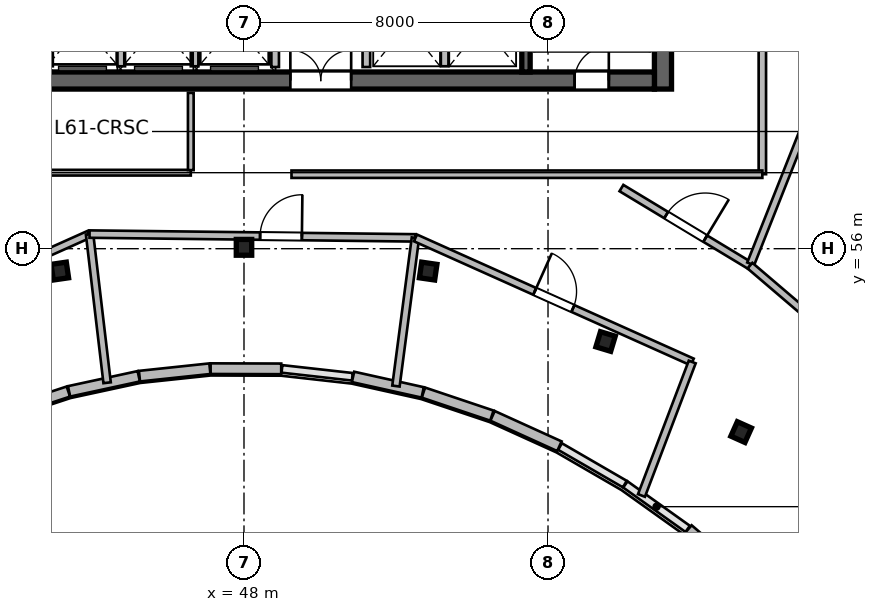
"""IFC4 building model, lengths in metres.
Left out: names, types, materials, properties, quantities, classifications, styles, units other than length and angle.
Written with IfcOpenShell. Run it as: python <this file> out.ifc"""

import sys

from ifc_helpers import new_model, si_unit, direction, frame, frame_2d, origin, origin_2d, place, context, subcontext, project, spatial, rectangle, i_section, extrude, source, transform, mapped, element, fill, save


model = new_model("IFC4")
c1 = context("Model", 3, precision=1e-05, world=origin(), true_north=direction((0.0, 1.0)))
c2 = subcontext(c1, "Body", "Model", "MODEL_VIEW")
j1 = project(units=[si_unit("LENGTHUNIT", "METRE"), si_unit("PLANEANGLEUNIT", "RADIAN")], contexts=[c1])
p1 = place(None, origin())
s1 = spatial("IfcSite", under=j1, at=p1, CompositionType="ELEMENT")
p2 = place(p1, origin())
s2 = spatial("IfcBuilding", under=s1, at=p2, CompositionType="ELEMENT")
p3 = place(p2, frame((0.0, 0.0, 250.8)))
s3 = spatial("IfcBuildingStorey", under=s2, at=p3, CompositionType="ELEMENT", Elevation=250.8)
m1 = source(origin(), c2, "Body", "SweptSolid", [
    extrude(rectangle(XDim=12.0, YDim=0.45, at=frame_2d((6.0, 0.0))), origin(), (0.0, 0.0, 1.0), 3.9),
])
p4 = place(p3, frame((59.025, 60.2, 0.0), z_axis=(0.0, 0.0, 1.0), x_axis=(0.0, 1.0, 0.0)))
e1 = element("IfcWall", 1, at=p4, inside=s3, PredefinedType="SHEAR", context=c2, shape_type="MappedRepresentation", body=[
    mapped(m1, transform((0.0, 0.0, 0.0), scale=1.0)),
])
m2 = source(origin(), c2, "Body", "SweptSolid", [
    extrude(rectangle(XDim=21.6, YDim=0.45, at=frame_2d((10.8, 0.0))), origin(), (0.0, 0.0, 1.0), 3.9),
])
p5 = place(p3, frame((37.2, 60.425, 0.0), z_axis=(0.0, 0.0, 1.0), x_axis=(1.0, 0.0, 0.0)))
e2 = element("IfcWall", 2, at=p5, inside=s3, PredefinedType="SHEAR", context=c2, shape_type="MappedRepresentation", body=[
    mapped(m2, transform((0.0, 0.0, 0.0), scale=1.0)),
])
p6 = place(p5, frame((1.1, 0.0, 0.0)))
e3 = element("IfcOpeningElement", 3, at=p6, cuts=e2, PredefinedType="OPENING", context=c2, shape_type="SweptSolid", body=[
    extrude(rectangle(XDim=1.15, YDim=2.15, at=frame_2d((0.575, 1.075))), frame((0.0, 0.235, 0.0), z_axis=(0.0, -1.0, 0.0), x_axis=(1.0, 0.0, 0.0)), (0.0, 0.0, 1.0), 0.47),
])
p7 = place(p5, frame((19.5, 0.0, 0.0)))
e4 = element("IfcOpeningElement", 4, at=p7, cuts=e2, PredefinedType="OPENING", context=c2, shape_type="SweptSolid", body=[
    extrude(rectangle(XDim=0.9, YDim=2.1, at=frame_2d((0.45, 1.05))), frame((0.0, 0.235, 0.0), z_axis=(0.0, -1.0, 0.0), x_axis=(1.0, 0.0, 0.0)), (0.0, 0.0, 1.0), 0.47),
])
p8 = place(p5, frame((12.02, 0.0, 0.0)))
e5 = element("IfcOpeningElement", 5, at=p8, cuts=e2, PredefinedType="OPENING", context=c2, shape_type="SweptSolid", body=[
    extrude(rectangle(XDim=1.6, YDim=2.15, at=frame_2d((0.8, 1.075))), frame((0.0, 0.235, 0.0), z_axis=(0.0, -1.0, 0.0), x_axis=(1.0, 0.0, 0.0)), (0.0, 0.0, 1.0), 0.47),
])
m3 = source(origin(), c2, "Body", "SweptSolid", [
    extrude(rectangle(XDim=11.1, YDim=0.22, at=frame_2d((5.55, 0.0))), origin(), (0.0, 0.0, 1.0), 3.9),
])
p9 = place(p3, frame((55.42, 60.65, 0.0), z_axis=(0.0, 0.0, 1.0), x_axis=(0.0, 1.0, 0.0)))
e6 = element("IfcWall", 6, at=p9, inside=s3, PredefinedType="SHEAR", context=c2, shape_type="MappedRepresentation", body=[
    mapped(m3, transform((0.0, 0.0, 0.0), scale=1.0)),
])
p10 = place(p9, frame((9.595, 0.0, 0.0)))
e7 = element("IfcOpeningElement", 7, at=p10, cuts=e6, PredefinedType="OPENING", context=c2, shape_type="SweptSolid", body=[
    extrude(rectangle(XDim=1.15, YDim=2.15, at=frame_2d((0.575, 1.075))), frame((0.0, 0.12, 0.0), z_axis=(0.0, -1.0, 0.0), x_axis=(1.0, 0.0, 0.0)), (0.0, 0.0, 1.0), 0.24),
])
m4 = source(origin(), c2, "Body", "SweptSolid", [
    extrude(i_section(OverallWidth=0.406, OverallDepth=0.416, WebThickness=0.03, FlangeThickness=0.048, at=origin_2d()), origin(), (0.0, 0.0, 1.0), 3.9),
])
for number, where, z_axis, x_axis in (
    (8, (43.154, 55.411, 0.0), (0.0, 0.0, 1.0), (-0.143, 0.99, 0.0)),
    (9, (48.0, 56.036, 0.0), (0.0, 0.0, 1.0), (0.0, 1.0, 0.0)),
    (10, (52.846, 55.411, 0.0), (0.0, 0.0, 1.0), (0.143, 0.99, 0.0)),
    (11, (57.515, 53.558, 0.0), (0.0, 0.0, 1.0), (0.289, 0.957, 0.0)),
    (12, (61.082, 51.175, 0.0), (0.0, 0.0, 1.0), (0.409, 0.912, 0.0)),
):
    element("IfcColumn", number, at=place(p3, frame(where, z_axis=z_axis, x_axis=x_axis)), inside=s3, PredefinedType="COLUMN", context=c2, shape_type="MappedRepresentation", body=[
        mapped(m4, transform((0.0, 0.0, 0.0), scale=1.0)),
    ])
m5 = source(origin(), c2, "Body", "SweptSolid", [
    extrude(rectangle(XDim=2.022, YDim=0.28, at=frame_2d((1.011, 0.0))), origin(), (0.0, 0.0, 1.0), 3.58),
])
p11 = place(p3, frame((61.222, 47.299, 0.0), z_axis=(0.0, 0.0, 1.0), x_axis=(-0.758343943716, 0.651854633358, 0.0)))
e13 = element("IfcWall", 13, at=p11, inside=s3, PredefinedType="SOLIDWALL", context=c2, shape_type="MappedRepresentation", body=[
    mapped(m5, transform((0.0, 0.0, 0.0), scale=1.0)),
])
m6 = source(origin(), c2, "Body", "SweptSolid", [
    extrude(rectangle(XDim=1.933, YDim=0.28, at=frame_2d((0.966, 0.0))), origin(), (0.0, 0.0, 1.0), 3.58),
])
p12 = place(p3, frame((56.3, 50.802, 0.0), z_axis=(0.0, 0.0, 1.0), x_axis=(-0.910478916145, 0.413555489936, 0.0)))
e14 = element("IfcWall", 14, at=p12, inside=s3, PredefinedType="SOLIDWALL", context=c2, shape_type="MappedRepresentation", body=[
    mapped(m6, transform((0.0, 0.0, 0.0), scale=1.0)),
])
m7 = source(origin(), c2, "Body", "SweptSolid", [
    extrude(rectangle(XDim=1.901, YDim=0.28, at=frame_2d((0.951, 0.0))), origin(), (0.0, 0.0, 1.0), 3.58),
])
p13 = place(p3, frame((54.523, 51.608, 0.0), z_axis=(0.0, 0.0, 1.0), x_axis=(-0.94793587841, 0.318461254194, 0.0)))
e15 = element("IfcWall", 15, at=p13, inside=s3, PredefinedType="SOLIDWALL", context=c2, shape_type="MappedRepresentation", body=[
    mapped(m7, transform((0.0, 0.0, 0.0), scale=1.0)),
])
m8 = source(origin(), c2, "Body", "SweptSolid", [
    extrude(rectangle(XDim=1.878, YDim=0.28, at=frame_2d((0.939, 0.0))), origin(), (0.0, 0.0, 1.0), 3.58),
])
p14 = place(p3, frame((52.702, 52.219, 0.0), z_axis=(0.0, 0.0, 1.0), x_axis=(-0.976138082714, 0.217150739061, 0.0)))
e16 = element("IfcWall", 16, at=p14, inside=s3, PredefinedType="SOLIDWALL", context=c2, shape_type="MappedRepresentation", body=[
    mapped(m8, transform((0.0, 0.0, 0.0), scale=1.0)),
])
m9 = source(origin(), c2, "Body", "SweptSolid", [
    extrude(rectangle(XDim=1.858, YDim=0.28, at=frame_2d((0.929, 0.0))), origin(), (0.0, 0.0, 1.0), 3.58),
])
p15 = place(p3, frame((48.979, 52.838, 0.0), z_axis=(0.0, 0.0, 1.0), x_axis=(-0.999995433965, 0.003021928128, 0.0)))
e17 = element("IfcWall", 17, at=p15, inside=s3, PredefinedType="SOLIDWALL", context=c2, shape_type="MappedRepresentation", body=[
    mapped(m9, transform((0.0, 0.0, 0.0), scale=1.0)),
])
m10 = source(origin(), c2, "Body", "SweptSolid", [
    extrude(rectangle(XDim=1.862, YDim=0.28, at=frame_2d((0.931, 0.0))), origin(), (0.0, 0.0, 1.0), 3.58),
])
p16 = place(p3, frame((47.102, 52.842, 0.0), z_axis=(0.0, 0.0, 1.0), x_axis=(-0.994430497743, -0.1053944266, 0.0)))
e18 = element("IfcWall", 18, at=p16, inside=s3, PredefinedType="SOLIDWALL", context=c2, shape_type="MappedRepresentation", body=[
    mapped(m10, transform((0.0, 0.0, 0.0), scale=1.0)),
])
m11 = source(origin(), c2, "Body", "SweptSolid", [
    extrude(rectangle(XDim=1.877, YDim=0.28, at=frame_2d((0.938, 0.0))), origin(), (0.0, 0.0, 1.0), 3.58),
])
p17 = place(p3, frame((45.231, 52.643, 0.0), z_axis=(0.0, 0.0, 1.0), x_axis=(-0.97737202312, -0.211527606761, 0.0)))
e19 = element("IfcWall", 19, at=p17, inside=s3, PredefinedType="SOLIDWALL", context=c2, shape_type="MappedRepresentation", body=[
    mapped(m11, transform((0.0, 0.0, 0.0), scale=1.0)),
])
m12 = source(origin(), c2, "Body", "SweptSolid", [
    extrude(rectangle(XDim=1.9, YDim=0.28, at=frame_2d((0.95, 0.0))), origin(), (0.0, 0.0, 1.0), 3.58),
])
p18 = place(p3, frame((43.378, 52.241, 0.0), z_axis=(0.0, 0.0, 1.0), x_axis=(-0.949693643068, -0.313180434121, 0.0)))
e20 = element("IfcWall", 20, at=p18, inside=s3, PredefinedType="SOLIDWALL", context=c2, shape_type="MappedRepresentation", body=[
    mapped(m12, transform((0.0, 0.0, 0.0), scale=1.0)),
])
m13 = source(origin(), c2, "Body", "SweptSolid", [
    extrude(rectangle(XDim=2.24, YDim=0.2, at=frame_2d((1.12, 0.0))), origin(), (0.0, 0.0, 1.0), 3.58),
])
for number, where, z_axis, x_axis in (
    (21, (48.82, 60.78, 0.0), (0.0, 0.0, 1.0), (0.0, 1.0, 0.0)),
    (22, (51.22, 60.78, 0.0), (0.0, 0.0, 1.0), (0.0, 1.0, 0.0)),
):
    element("IfcWall", number, at=place(p3, frame(where, z_axis=z_axis, x_axis=x_axis)), inside=s3, PredefinedType="SOLIDWALL", context=c2, shape_type="MappedRepresentation", body=[
        mapped(m13, transform((0.0, 0.0, 0.0), scale=1.0)),
    ])
m14 = source(origin(), c2, "Body", "SweptSolid", [
    extrude(rectangle(XDim=2.2, YDim=0.2, at=frame_2d((1.1, 0.0))), origin(), (0.0, 0.0, 1.0), 3.58),
])
for number, where, z_axis, x_axis in (
    (23, (42.87, 60.8, 0.0), (0.0, 0.0, 1.0), (0.0, 1.0, 0.0)),
    (24, (44.77, 60.8, 0.0), (0.0, 0.0, 1.0), (0.0, 1.0, 0.0)),
    (25, (46.7, 60.8, 0.0), (0.0, 0.0, 1.0), (0.0, 1.0, 0.0)),
    (26, (53.28, 60.8, 0.0), (0.0, 0.0, 1.0), (0.0, 1.0, 0.0)),
):
    element("IfcWall", number, at=place(p3, frame(where, z_axis=z_axis, x_axis=x_axis)), inside=s3, PredefinedType="SOLIDWALL", context=c2, shape_type="MappedRepresentation", body=[
        mapped(m14, transform((0.0, 0.0, 0.0), scale=1.0)),
    ])
m15 = source(origin(), c2, "Body", "SweptSolid", [
    extrude(rectangle(XDim=5.4, YDim=0.15, at=frame_2d((2.7, 0.0))), origin(), (0.0, 0.0, 1.0), 3.58),
])
p19 = place(p3, frame((41.2, 58.0, 0.0), z_axis=(0.0, 0.0, 1.0), x_axis=(1.0, 0.0, 0.0)))
e27 = element("IfcWall", 27, at=p19, inside=s3, PredefinedType="PARTITIONING", context=c2, shape_type="MappedRepresentation", body=[
    mapped(m15, transform((0.0, 0.0, 0.0), scale=1.0)),
])
m16 = source(origin(), c2, "Body", "SweptSolid", [
    extrude(rectangle(XDim=2.033, YDim=0.15, at=frame_2d((1.016, 0.0))), origin(), (0.0, 0.0, 1.0), 3.58),
])
p20 = place(p3, frame((46.6, 58.067, 0.0), z_axis=(0.0, 0.0, 1.0), x_axis=(0.0, 1.0, 0.0)))
e28 = element("IfcWall", 28, at=p20, inside=s3, PredefinedType="PARTITIONING", context=c2, shape_type="MappedRepresentation", body=[
    mapped(m16, transform((0.0, 0.0, 0.0), scale=1.0)),
])
m17 = source(origin(), c2, "Body", "SweptSolid", [
    extrude(rectangle(XDim=8.913, YDim=0.195, at=frame_2d((4.457, 0.0))), origin(), (0.0, 0.0, 1.0), 3.58),
])
p21 = place(p3, frame((35.803, 52.738, 0.0), z_axis=(0.0, 0.0, 1.0), x_axis=(0.912488521546, 0.409102307555, 0.0)))
e29 = element("IfcWall", 29, at=p21, inside=s3, PredefinedType="PARTITIONING", context=c2, shape_type="MappedRepresentation", body=[
    mapped(m17, transform((0.0, 0.0, 0.0), scale=1.0)),
])
p22 = place(p21, frame((3.906, 0.0, 0.0)))
e30 = element("IfcOpeningElement", 30, at=p22, cuts=e29, PredefinedType="OPENING", context=c2, shape_type="SweptSolid", body=[
    extrude(rectangle(XDim=1.1, YDim=2.15, at=frame_2d((0.55, 1.075))), frame((0.0, 0.107, 0.0), z_axis=(0.0, -1.0, 0.0), x_axis=(1.0, 0.0, 0.0)), (0.0, 0.0, 1.0), 0.215),
])
m18 = source(origin(), c2, "Body", "SweptSolid", [
    extrude(rectangle(XDim=3.939, YDim=0.195, at=frame_2d((1.969, 0.0))), origin(), (0.0, 0.0, 1.0), 3.58),
])
p23 = place(p3, frame((44.398, 52.473, 0.0), z_axis=(0.0, 0.0, 1.0), x_axis=(-0.117395053494, 0.993085294129, 0.0)))
e31 = element("IfcWall", 31, at=p23, inside=s3, PredefinedType="PARTITIONING", context=c2, shape_type="MappedRepresentation", body=[
    mapped(m18, transform((0.0, 0.0, 0.0), scale=1.0)),
])
m19 = source(origin(), c2, "Body", "SweptSolid", [
    extrude(rectangle(XDim=8.576, YDim=0.195, at=frame_2d((4.288, 0.0))), origin(), (0.0, 0.0, 1.0), 3.58),
])
p24 = place(p3, frame((43.936, 56.385, 0.0), z_axis=(0.0, 0.0, 1.0), x_axis=(0.999931553434, -0.011699933624, 0.0)))
e32 = element("IfcWall", 32, at=p24, inside=s3, PredefinedType="PARTITIONING", context=c2, shape_type="MappedRepresentation", body=[
    mapped(m19, transform((0.0, 0.0, 0.0), scale=1.0)),
])
p25 = place(p24, frame((4.488, 0.0, 0.0)))
e33 = element("IfcOpeningElement", 33, at=p25, cuts=e32, PredefinedType="OPENING", context=c2, shape_type="SweptSolid", body=[
    extrude(rectangle(XDim=1.1, YDim=2.15, at=frame_2d((0.55, 1.075))), frame((0.0, 0.107, 0.0), z_axis=(0.0, -1.0, 0.0), x_axis=(1.0, 0.0, 0.0)), (0.0, 0.0, 1.0), 0.215),
])
m20 = source(origin(), c2, "Body", "SweptSolid", [
    extrude(rectangle(XDim=3.932, YDim=0.195, at=frame_2d((1.966, 0.0))), origin(), (0.0, 0.0, 1.0), 3.58),
])
p26 = place(p3, frame((51.998, 52.385, 0.0), z_axis=(0.0, 0.0, 1.0), x_axis=(0.130504299366, 0.991447743377, 0.0)))
e34 = element("IfcWall", 34, at=p26, inside=s3, PredefinedType="PARTITIONING", context=c2, shape_type="MappedRepresentation", body=[
    mapped(m20, transform((0.0, 0.0, 0.0), scale=1.0)),
])
m21 = source(origin(), c2, "Body", "SweptSolid", [
    extrude(rectangle(XDim=7.982, YDim=0.195, at=frame_2d((3.991, 0.0))), origin(), (0.0, 0.0, 1.0), 3.58),
])
p27 = place(p3, frame((52.511, 56.284, 0.0), z_axis=(0.0, 0.0, 1.0), x_axis=(0.91248609472, -0.409107720464, 0.0)))
e35 = element("IfcWall", 35, at=p27, inside=s3, PredefinedType="PARTITIONING", context=c2, shape_type="MappedRepresentation", body=[
    mapped(m21, transform((0.0, 0.0, 0.0), scale=1.0)),
])
p28 = place(p27, frame((3.441, 0.0, 0.0)))
e36 = element("IfcOpeningElement", 36, at=p28, cuts=e35, PredefinedType="OPENING", context=c2, shape_type="SweptSolid", body=[
    extrude(rectangle(XDim=1.1, YDim=2.15, at=frame_2d((0.55, 1.075))), frame((0.0, 0.107, 0.0), z_axis=(0.0, -1.0, 0.0), x_axis=(1.0, 0.0, 0.0)), (0.0, 0.0, 1.0), 0.215),
])
m22 = source(origin(), c2, "Body", "SweptSolid", [
    extrude(rectangle(XDim=3.757, YDim=0.195, at=frame_2d((1.879, 0.0))), origin(), (0.0, 0.0, 1.0), 3.58),
])
p29 = place(p3, frame((58.459, 49.507, 0.0), z_axis=(0.0, 0.0, 1.0), x_axis=(0.355427833237, 0.93470372598, 0.0)))
e37 = element("IfcWall", 37, at=p29, inside=s3, PredefinedType="PARTITIONING", context=c2, shape_type="MappedRepresentation", body=[
    mapped(m22, transform((0.0, 0.0, 0.0), scale=1.0)),
])
m23 = source(origin(), c2, "Body", "SweptSolid", [
    extrude(rectangle(XDim=3.951, YDim=0.195, at=frame_2d((1.975, 0.0))), origin(), (0.0, 0.0, 1.0), 3.58),
])
p30 = place(p3, frame((57.932, 57.596, 0.0), z_axis=(0.0, 0.0, 1.0), x_axis=(0.856137696849, -0.51674775668, 0.0)))
e38 = element("IfcWall", 38, at=p30, inside=s3, PredefinedType="PARTITIONING", context=c2, shape_type="MappedRepresentation", body=[
    mapped(m23, transform((0.0, 0.0, 0.0), scale=1.0)),
])
p31 = place(p30, frame((1.375, 0.0, 0.0)))
e39 = element("IfcOpeningElement", 39, at=p31, cuts=e38, PredefinedType="OPENING", context=c2, shape_type="SweptSolid", body=[
    extrude(rectangle(XDim=1.2, YDim=2.15, at=frame_2d((0.6, 1.075))), frame((0.0, 0.107, 0.0), z_axis=(0.0, -1.0, 0.0), x_axis=(1.0, 0.0, 0.0)), (0.0, 0.0, 1.0), 0.215),
])
m24 = source(origin(), c2, "Body", "SweptSolid", [
    extrude(rectangle(XDim=18.471, YDim=0.195, at=frame_2d((9.235, 0.0))), origin(), (0.0, 0.0, 1.0), 3.58),
])
p32 = place(p3, frame((61.333, 55.602, 0.0), z_axis=(0.0, 0.0, 1.0), x_axis=(0.368827756565, 0.929497760076, 0.0)))
e40 = element("IfcWall", 40, at=p32, inside=s3, PredefinedType="PARTITIONING", context=c2, shape_type="MappedRepresentation", body=[
    mapped(m24, transform((0.0, 0.0, 0.0), scale=1.0)),
])
m25 = source(origin(), c2, "Body", "SweptSolid", [
    extrude(rectangle(XDim=4.935, YDim=0.195, at=frame_2d((2.467, 0.0))), origin(), (0.0, 0.0, 1.0), 3.58),
])
p33 = place(p3, frame((61.314, 55.554, 0.0), z_axis=(0.0, 0.0, 1.0), x_axis=(0.760547222161, -0.649282621716, 0.0)))
e41 = element("IfcWall", 41, at=p33, inside=s3, PredefinedType="PARTITIONING", context=c2, shape_type="MappedRepresentation", body=[
    mapped(m25, transform((0.0, 0.0, 0.0), scale=1.0)),
])
p34 = place(p33, frame((1.867, 0.0, 0.0)))
e42 = element("IfcOpeningElement", 42, at=p34, cuts=e41, PredefinedType="OPENING", context=c2, shape_type="SweptSolid", body=[
    extrude(rectangle(XDim=1.2, YDim=2.15, at=frame_2d((0.6, 1.075))), frame((0.0, 0.107, 0.0), z_axis=(0.0, -1.0, 0.0), x_axis=(1.0, 0.0, 0.0)), (0.0, 0.0, 1.0), 0.215),
])
m26 = source(origin(), c2, "Body", "SweptSolid", [
    extrude(rectangle(XDim=18.567, YDim=0.195, at=frame_2d((9.284, 0.0))), origin(), (0.0, 0.0, 1.0), 3.58),
])
p35 = place(p3, frame((61.64, 57.96, 0.0), z_axis=(0.0, 0.0, 1.0), x_axis=(0.0, 1.0, 0.0)))
e43 = element("IfcWall", 43, at=p35, inside=s3, PredefinedType="PARTITIONING", context=c2, shape_type="MappedRepresentation", body=[
    mapped(m26, transform((0.0, 0.0, 0.0), scale=1.0)),
])
m27 = source(origin(), c2, "Body", "SweptSolid", [
    extrude(rectangle(XDim=12.39, YDim=0.195, at=frame_2d((6.195, 0.0))), origin(), (0.0, 0.0, 1.0), 3.58),
])
p36 = place(p3, frame((49.25, 57.96, 0.0), z_axis=(0.0, 0.0, 1.0), x_axis=(1.0, 0.0, 0.0)))
e44 = element("IfcWall", 44, at=p36, inside=s3, PredefinedType="PARTITIONING", context=c2, shape_type="MappedRepresentation", body=[
    mapped(m27, transform((0.0, 0.0, 0.0), scale=1.0)),
])
m28 = source(origin(), c2, "Body", "SweptSolid", [
    extrude(rectangle(XDim=0.9, YDim=2.1, at=frame_2d((0.45, 1.05))), frame((0.0, 0.025, 0.0), z_axis=(0.0, -1.0, 0.0), x_axis=(1.0, 0.0, 0.0)), (0.0, 0.0, 1.0), 0.05),
])
p37 = place(p7, origin())
e45 = element("IfcDoor", 45, at=p37, inside=s3, OperationType="SINGLE_SWING_RIGHT", PredefinedType="DOOR", context=c2, shape_type="MappedRepresentation", body=[
    mapped(m28, transform((0.0, 0.0, 0.0), scale=1.0)),
])
fill(e4, e45)
m29 = source(origin(), c2, "Body", "SweptSolid", [
    extrude(rectangle(XDim=1.6, YDim=2.15, at=frame_2d((0.8, 1.075))), frame((0.0, 0.025, 0.0), z_axis=(0.0, -1.0, 0.0), x_axis=(1.0, 0.0, 0.0)), (0.0, 0.0, 1.0), 0.05),
])
p38 = place(p8, origin())
e46 = element("IfcDoor", 46, at=p38, inside=s3, OperationType="DOUBLE_DOOR_SINGLE_SWING", PredefinedType="DOOR", context=c2, shape_type="MappedRepresentation", body=[
    mapped(m29, transform((0.0, 0.0, 0.0), scale=1.0)),
])
fill(e5, e46)
m30 = source(origin(), c2, "Body", "SweptSolid", [
    extrude(rectangle(XDim=1.1, YDim=2.15, at=frame_2d((0.55, 1.075))), frame((0.0, 0.025, 0.0), z_axis=(0.0, -1.0, 0.0), x_axis=(1.0, 0.0, 0.0)), (0.0, 0.0, 1.0), 0.05),
])
p39 = place(p25, origin())
e47 = element("IfcDoor", 47, at=p39, inside=s3, OperationType="SINGLE_SWING_RIGHT", PredefinedType="DOOR", context=c2, shape_type="MappedRepresentation", body=[
    mapped(m30, transform((0.0, 0.0, 0.0), scale=1.0)),
])
fill(e33, e47)
p40 = place(p28, origin())
e48 = element("IfcDoor", 48, at=p40, inside=s3, OperationType="SINGLE_SWING_LEFT", PredefinedType="DOOR", context=c2, shape_type="MappedRepresentation", body=[
    mapped(m30, transform((0.0, 0.0, 0.0), scale=1.0)),
])
fill(e36, e48)
m31 = source(origin(), c2, "Body", "SweptSolid", [
    extrude(rectangle(XDim=1.2, YDim=2.15, at=frame_2d((0.6, 1.075))), frame((0.0, 0.025, 0.0), z_axis=(0.0, -1.0, 0.0), x_axis=(1.0, 0.0, 0.0)), (0.0, 0.0, 1.0), 0.05),
])
p41 = place(p31, origin())
e49 = element("IfcDoor", 49, at=p41, inside=s3, OperationType="SINGLE_SWING_RIGHT", PredefinedType="DOOR", context=c2, shape_type="MappedRepresentation", body=[
    mapped(m31, transform((0.0, 0.0, 0.0), scale=1.0)),
])
fill(e39, e49)
save(model, sys.argv[1])
